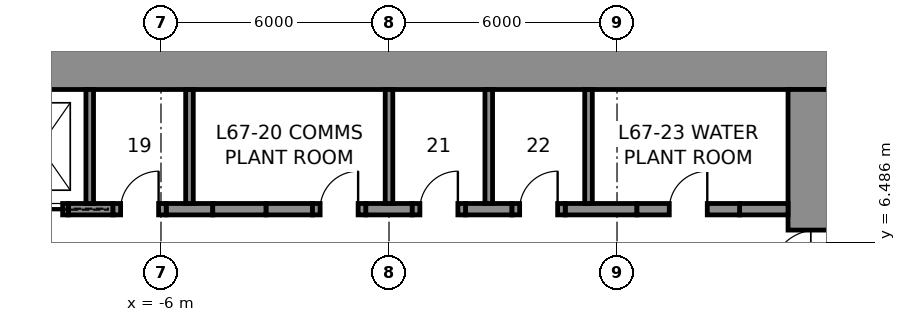
"""IFC4 building model, lengths in metres.
Left out: names, types, materials, properties, quantities, classifications, styles, units other than length and angle.
Written with IfcOpenShell. Run it as: python <this file> out.ifc"""

import sys

from ifc_helpers import new_model, si_unit, direction, frame, frame_2d, origin, place, context, subcontext, project, spatial, rectangle, extrude, element, fill, save


model = new_model("IFC4")
c1 = context("Model", 3, precision=1e-05, world=origin(), true_north=direction((0.0, 1.0)))
c2 = subcontext(c1, "Body", "Model", "MODEL_VIEW")
j1 = project(units=[si_unit("LENGTHUNIT", "METRE"), si_unit("PLANEANGLEUNIT", "RADIAN")], contexts=[c1])
p1 = place(None, origin())
s1 = spatial("IfcSite", under=j1, at=p1, CompositionType="ELEMENT")
p2 = place(p1, origin())
s2 = spatial("IfcBuilding", under=s1, at=p2, CompositionType="ELEMENT")
p3 = place(p2, frame((0.0, 0.0, 297.8)))
s3 = spatial("IfcBuildingStorey", under=s2, at=p3, CompositionType="ELEMENT", Elevation=297.8)
p4 = place(p3, frame((-12.0, 11.25, 0.0), z_axis=(0.0, 0.0, 1.0), x_axis=(1.0, 0.0, 0.0)))
e1 = element("IfcWall", 1, at=p4, inside=s3, PredefinedType="SHEAR", context=c2, shape_type="SweptSolid", body=[
    extrude(rectangle(XDim=24.0, YDim=1.5, at=frame_2d((12.0, 0.0))), origin(), (0.0, 0.0, 1.0), 5.0),
])
p5 = place(p3, frame((11.25, 10.5, 0.0), z_axis=(0.0, 0.0, 1.0), x_axis=(0.0, -1.0, 0.0)))
e2 = element("IfcWall", 2, at=p5, inside=s3, PredefinedType="SHEAR", context=c2, shape_type="SweptSolid", body=[
    extrude(rectangle(XDim=21.0, YDim=1.5, at=frame_2d((10.5, 0.0))), origin(), (0.0, 0.0, 1.0), 5.0),
])
p6 = place(p5, frame((3.7, 0.0, 0.0)))
e3 = element("IfcOpeningElement", 3, at=p6, cuts=e2, PredefinedType="OPENING", context=c2, shape_type="SweptSolid", body=[
    extrude(rectangle(XDim=1.2, YDim=2.3, at=frame_2d((0.6, 1.15))), frame((0.0, 0.76, 0.0), z_axis=(0.0, -1.0, 0.0), x_axis=(1.0, 0.0, 0.0)), (0.0, 0.0, 1.0), 1.52),
])
p7 = place(p5, frame((16.1, 0.0, 0.0)))
e4 = element("IfcOpeningElement", 4, at=p7, cuts=e2, PredefinedType="OPENING", context=c2, shape_type="SweptSolid", body=[
    extrude(rectangle(XDim=1.2, YDim=2.3, at=frame_2d((0.6, 1.15))), frame((0.0, 0.76, 0.0), z_axis=(0.0, -1.0, 0.0), x_axis=(1.0, 0.0, 0.0)), (0.0, 0.0, 1.0), 1.52),
])
p8 = place(p3, frame((-8.438, 7.35, 0.0), z_axis=(0.0, 0.0, 1.0), x_axis=(1.0, 0.0, 0.0)))
e5 = element("IfcWall", 5, at=p8, inside=s3, PredefinedType="SHEAR", context=c2, shape_type="SweptSolid", body=[
    extrude(rectangle(XDim=1.175, YDim=0.3, at=frame_2d((0.587, 0.0))), origin(), (0.0, 0.0, 1.0), 5.0),
])
for number, where, z_axis, x_axis in (
    (6, (-5.863, 7.35, 0.0), (0.0, 0.0, 1.0), (1.0, 0.0, 0.0)),
    (7, (-3.238, 7.35, 0.0), (0.0, 0.0, 1.0), (1.0, 0.0, 0.0)),
    (8, (-0.613, 7.35, 0.0), (0.0, 0.0, 1.0), (1.0, 0.0, 0.0)),
    (9, (2.012, 7.35, 0.0), (0.0, 0.0, 1.0), (1.0, 0.0, 0.0)),
):
    element("IfcWall", number, at=place(p3, frame(where, z_axis=z_axis, x_axis=x_axis)), inside=s3, PredefinedType="SHEAR", context=c2, shape_type="SweptSolid", body=[
        extrude(rectangle(XDim=1.225, YDim=0.3, at=frame_2d((0.613, 0.0))), origin(), (0.0, 0.0, 1.0), 5.0),
    ])
p9 = place(p3, frame((4.637, 7.35, 0.0), z_axis=(0.0, 0.0, 1.0), x_axis=(1.0, 0.0, 0.0)))
e10 = element("IfcWall", 10, at=p9, inside=s3, PredefinedType="SHEAR", context=c2, shape_type="SweptSolid", body=[
    extrude(rectangle(XDim=1.887, YDim=0.3, at=frame_2d((0.944, 0.0))), origin(), (0.0, 0.0, 1.0), 5.0),
])
p10 = place(p3, frame((9.225, 7.35, 0.0), z_axis=(0.0, 0.0, 1.0), x_axis=(1.0, 0.0, 0.0)))
e11 = element("IfcWall", 11, at=p10, inside=s3, PredefinedType="SHEAR", context=c2, shape_type="SweptSolid", body=[
    extrude(rectangle(XDim=1.275, YDim=0.3, at=frame_2d((0.637, 0.0))), origin(), (0.0, 0.0, 1.0), 5.0),
])
p11 = place(p3, frame((-9.938, 7.35, 0.0), z_axis=(0.0, 0.0, 1.0), x_axis=(1.0, 0.0, 0.0)))
e12 = element("IfcWall", 12, at=p11, inside=s3, PredefinedType="PARTITIONING", context=c2, shape_type="SweptSolid", body=[
    extrude(rectangle(XDim=1.5, YDim=0.3, at=frame_2d((0.75, 0.0))), origin(), (0.0, 0.0, 1.0), 5.0),
])
p12 = place(p11, frame((0.15, 0.0, 0.0)))
e13 = element("IfcOpeningElement", 13, at=p12, cuts=e12, PredefinedType="OPENING", context=c2, shape_type="SweptSolid", body=[
    extrude(rectangle(XDim=1.2, YDim=2.3, at=frame_2d((0.6, 1.15))), frame((0.0, 0.16, 0.0), z_axis=(0.0, -1.0, 0.0), x_axis=(1.0, 0.0, 0.0)), (0.0, 0.0, 1.0), 0.32),
])
p13 = place(p3, frame((-7.262, 7.35, 0.0), z_axis=(0.0, 0.0, 1.0), x_axis=(1.0, 0.0, 0.0)))
e14 = element("IfcWall", 14, at=p13, inside=s3, PredefinedType="PARTITIONING", context=c2, shape_type="SweptSolid", body=[
    extrude(rectangle(XDim=1.4, YDim=0.3, at=frame_2d((0.7, 0.0))), origin(), (0.0, 0.0, 1.0), 5.0),
])
p14 = place(p13, frame((0.2, 0.0, 0.0)))
e15 = element("IfcOpeningElement", 15, at=p14, cuts=e14, PredefinedType="OPENING", context=c2, shape_type="SweptSolid", body=[
    extrude(rectangle(XDim=1.0, YDim=2.3, at=frame_2d((0.5, 1.15))), frame((0.0, 0.16, 0.0), z_axis=(0.0, -1.0, 0.0), x_axis=(1.0, 0.0, 0.0)), (0.0, 0.0, 1.0), 0.32),
])
p15 = place(p3, frame((-4.637, 7.35, 0.0), z_axis=(0.0, 0.0, 1.0), x_axis=(1.0, 0.0, 0.0)))
e16 = element("IfcWall", 16, at=p15, inside=s3, PredefinedType="PARTITIONING", context=c2, shape_type="SweptSolid", body=[
    extrude(rectangle(XDim=1.4, YDim=0.3, at=frame_2d((0.7, 0.0))), origin(), (0.0, 0.0, 1.0), 5.0),
])
p16 = place(p3, frame((-2.012, 7.35, 0.0), z_axis=(0.0, 0.0, 1.0), x_axis=(1.0, 0.0, 0.0)))
e17 = element("IfcWall", 17, at=p16, inside=s3, PredefinedType="PARTITIONING", context=c2, shape_type="SweptSolid", body=[
    extrude(rectangle(XDim=1.4, YDim=0.3, at=frame_2d((0.7, 0.0))), origin(), (0.0, 0.0, 1.0), 5.0),
])
p17 = place(p16, frame((0.2, 0.0, 0.0)))
e18 = element("IfcOpeningElement", 18, at=p17, cuts=e17, PredefinedType="OPENING", context=c2, shape_type="SweptSolid", body=[
    extrude(rectangle(XDim=1.0, YDim=2.3, at=frame_2d((0.5, 1.15))), frame((0.0, 0.16, 0.0), z_axis=(0.0, -1.0, 0.0), x_axis=(1.0, 0.0, 0.0)), (0.0, 0.0, 1.0), 0.32),
])
p18 = place(p3, frame((0.613, 7.35, 0.0), z_axis=(0.0, 0.0, 1.0), x_axis=(1.0, 0.0, 0.0)))
e19 = element("IfcWall", 19, at=p18, inside=s3, PredefinedType="PARTITIONING", context=c2, shape_type="SweptSolid", body=[
    extrude(rectangle(XDim=1.4, YDim=0.3, at=frame_2d((0.7, 0.0))), origin(), (0.0, 0.0, 1.0), 5.0),
])
p19 = place(p18, frame((0.2, 0.0, 0.0)))
e20 = element("IfcOpeningElement", 20, at=p19, cuts=e19, PredefinedType="OPENING", context=c2, shape_type="SweptSolid", body=[
    extrude(rectangle(XDim=1.0, YDim=2.3, at=frame_2d((0.5, 1.15))), frame((0.0, 0.16, 0.0), z_axis=(0.0, -1.0, 0.0), x_axis=(1.0, 0.0, 0.0)), (0.0, 0.0, 1.0), 0.32),
])
p20 = place(p3, frame((3.238, 7.35, 0.0), z_axis=(0.0, 0.0, 1.0), x_axis=(1.0, 0.0, 0.0)))
e21 = element("IfcWall", 21, at=p20, inside=s3, PredefinedType="PARTITIONING", context=c2, shape_type="SweptSolid", body=[
    extrude(rectangle(XDim=1.4, YDim=0.3, at=frame_2d((0.7, 0.0))), origin(), (0.0, 0.0, 1.0), 5.0),
])
p21 = place(p20, frame((0.2, 0.0, 0.0)))
e22 = element("IfcOpeningElement", 22, at=p21, cuts=e21, PredefinedType="OPENING", context=c2, shape_type="SweptSolid", body=[
    extrude(rectangle(XDim=1.0, YDim=2.3, at=frame_2d((0.5, 1.15))), frame((0.0, 0.16, 0.0), z_axis=(0.0, -1.0, 0.0), x_axis=(1.0, 0.0, 0.0)), (0.0, 0.0, 1.0), 0.32),
])
p22 = place(p3, frame((6.525, 7.35, 0.0), z_axis=(0.0, 0.0, 1.0), x_axis=(1.0, 0.0, 0.0)))
e23 = element("IfcWall", 23, at=p22, inside=s3, PredefinedType="PARTITIONING", context=c2, shape_type="SweptSolid", body=[
    extrude(rectangle(XDim=2.7, YDim=0.3, at=frame_2d((1.35, 0.0))), origin(), (0.0, 0.0, 1.0), 5.0),
])
p23 = place(p22, frame((0.85, 0.0, 0.0)))
e24 = element("IfcOpeningElement", 24, at=p23, cuts=e23, PredefinedType="OPENING", context=c2, shape_type="SweptSolid", body=[
    extrude(rectangle(XDim=1.0, YDim=2.3, at=frame_2d((0.5, 1.15))), frame((0.0, 0.16, 0.0), z_axis=(0.0, -1.0, 0.0), x_axis=(1.0, 0.0, 0.0)), (0.0, 0.0, 1.0), 0.32),
])
for number, where, z_axis, x_axis in (
    (25, (-7.875, 7.5, 0.0), (0.0, 0.0, 1.0), (0.0, 1.0, 0.0)),
    (26, (-5.25, 7.5, 0.0), (0.0, 0.0, 1.0), (0.0, 1.0, 0.0)),
    (27, (0.0, 7.5, 0.0), (0.0, 0.0, 1.0), (0.0, 1.0, 0.0)),
    (28, (2.625, 7.5, 0.0), (0.0, 0.0, 1.0), (0.0, 1.0, 0.0)),
    (29, (5.25, 7.5, 0.0), (0.0, 0.0, 1.0), (0.0, 1.0, 0.0)),
):
    element("IfcWall", number, at=place(p3, frame(where, z_axis=z_axis, x_axis=x_axis)), inside=s3, PredefinedType="PARTITIONING", context=c2, shape_type="SweptSolid", body=[
        extrude(rectangle(XDim=3.0, YDim=0.2, at=frame_2d((1.5, 0.0))), origin(), (0.0, 0.0, 1.0), 5.0),
    ])
p24 = place(p14, origin())
e30 = element("IfcDoor", 30, at=p24, inside=s3, OperationType="SINGLE_SWING_RIGHT", PredefinedType="DOOR", context=c2, shape_type="SweptSolid", body=[
    extrude(rectangle(XDim=1.0, YDim=2.3, at=frame_2d((0.5, 1.15))), frame((0.0, 0.025, 0.0), z_axis=(0.0, -1.0, 0.0), x_axis=(1.0, 0.0, 0.0)), (0.0, 0.0, 1.0), 0.05),
])
fill(e15, e30)
p25 = place(p17, origin())
e31 = element("IfcDoor", 31, at=p25, inside=s3, OperationType="SINGLE_SWING_RIGHT", PredefinedType="DOOR", context=c2, shape_type="SweptSolid", body=[
    extrude(rectangle(XDim=1.0, YDim=2.3, at=frame_2d((0.5, 1.15))), frame((0.0, 0.025, 0.0), z_axis=(0.0, -1.0, 0.0), x_axis=(1.0, 0.0, 0.0)), (0.0, 0.0, 1.0), 0.05),
])
fill(e18, e31)
p26 = place(p19, origin())
e32 = element("IfcDoor", 32, at=p26, inside=s3, OperationType="SINGLE_SWING_RIGHT", PredefinedType="DOOR", context=c2, shape_type="SweptSolid", body=[
    extrude(rectangle(XDim=1.0, YDim=2.3, at=frame_2d((0.5, 1.15))), frame((0.0, 0.025, 0.0), z_axis=(0.0, -1.0, 0.0), x_axis=(1.0, 0.0, 0.0)), (0.0, 0.0, 1.0), 0.05),
])
fill(e20, e32)
p27 = place(p21, origin())
e33 = element("IfcDoor", 33, at=p27, inside=s3, OperationType="SINGLE_SWING_RIGHT", PredefinedType="DOOR", context=c2, shape_type="SweptSolid", body=[
    extrude(rectangle(XDim=1.0, YDim=2.3, at=frame_2d((0.5, 1.15))), frame((0.0, 0.025, 0.0), z_axis=(0.0, -1.0, 0.0), x_axis=(1.0, 0.0, 0.0)), (0.0, 0.0, 1.0), 0.05),
])
fill(e22, e33)
p28 = place(p23, origin())
e34 = element("IfcDoor", 34, at=p28, inside=s3, OperationType="SINGLE_SWING_RIGHT", PredefinedType="DOOR", context=c2, shape_type="SweptSolid", body=[
    extrude(rectangle(XDim=1.0, YDim=2.3, at=frame_2d((0.5, 1.15))), frame((0.0, 0.025, 0.0), z_axis=(0.0, -1.0, 0.0), x_axis=(1.0, 0.0, 0.0)), (0.0, 0.0, 1.0), 0.05),
])
fill(e24, e34)
p29 = place(p6, frame((1.2, 0.0, 0.0), z_axis=(0.0, 0.0, 1.0), x_axis=(-1.0, 0.0, 0.0)))
e35 = element("IfcDoor", 35, at=p29, inside=s3, OperationType="SINGLE_SWING_LEFT", PredefinedType="DOOR", context=c2, shape_type="SweptSolid", body=[
    extrude(rectangle(XDim=1.2, YDim=2.3, at=frame_2d((0.6, 1.15))), frame((0.0, 0.025, 0.0), z_axis=(0.0, -1.0, 0.0), x_axis=(1.0, 0.0, 0.0)), (0.0, 0.0, 1.0), 0.05),
])
fill(e3, e35)
p30 = place(p12, frame((1.2, 0.0, 0.0), z_axis=(0.0, 0.0, 1.0), x_axis=(-1.0, 0.0, 0.0)))
e36 = element("IfcDoor", 36, at=p30, inside=s3, OperationType="SLIDING_TO_LEFT", PredefinedType="DOOR", context=c2, shape_type="SweptSolid", body=[
    extrude(rectangle(XDim=1.2, YDim=2.3, at=frame_2d((0.6, 1.15))), frame((0.0, 0.025, 0.0), z_axis=(0.0, -1.0, 0.0), x_axis=(1.0, 0.0, 0.0)), (0.0, 0.0, 1.0), 0.05),
])
fill(e13, e36)
save(model, sys.argv[1])
